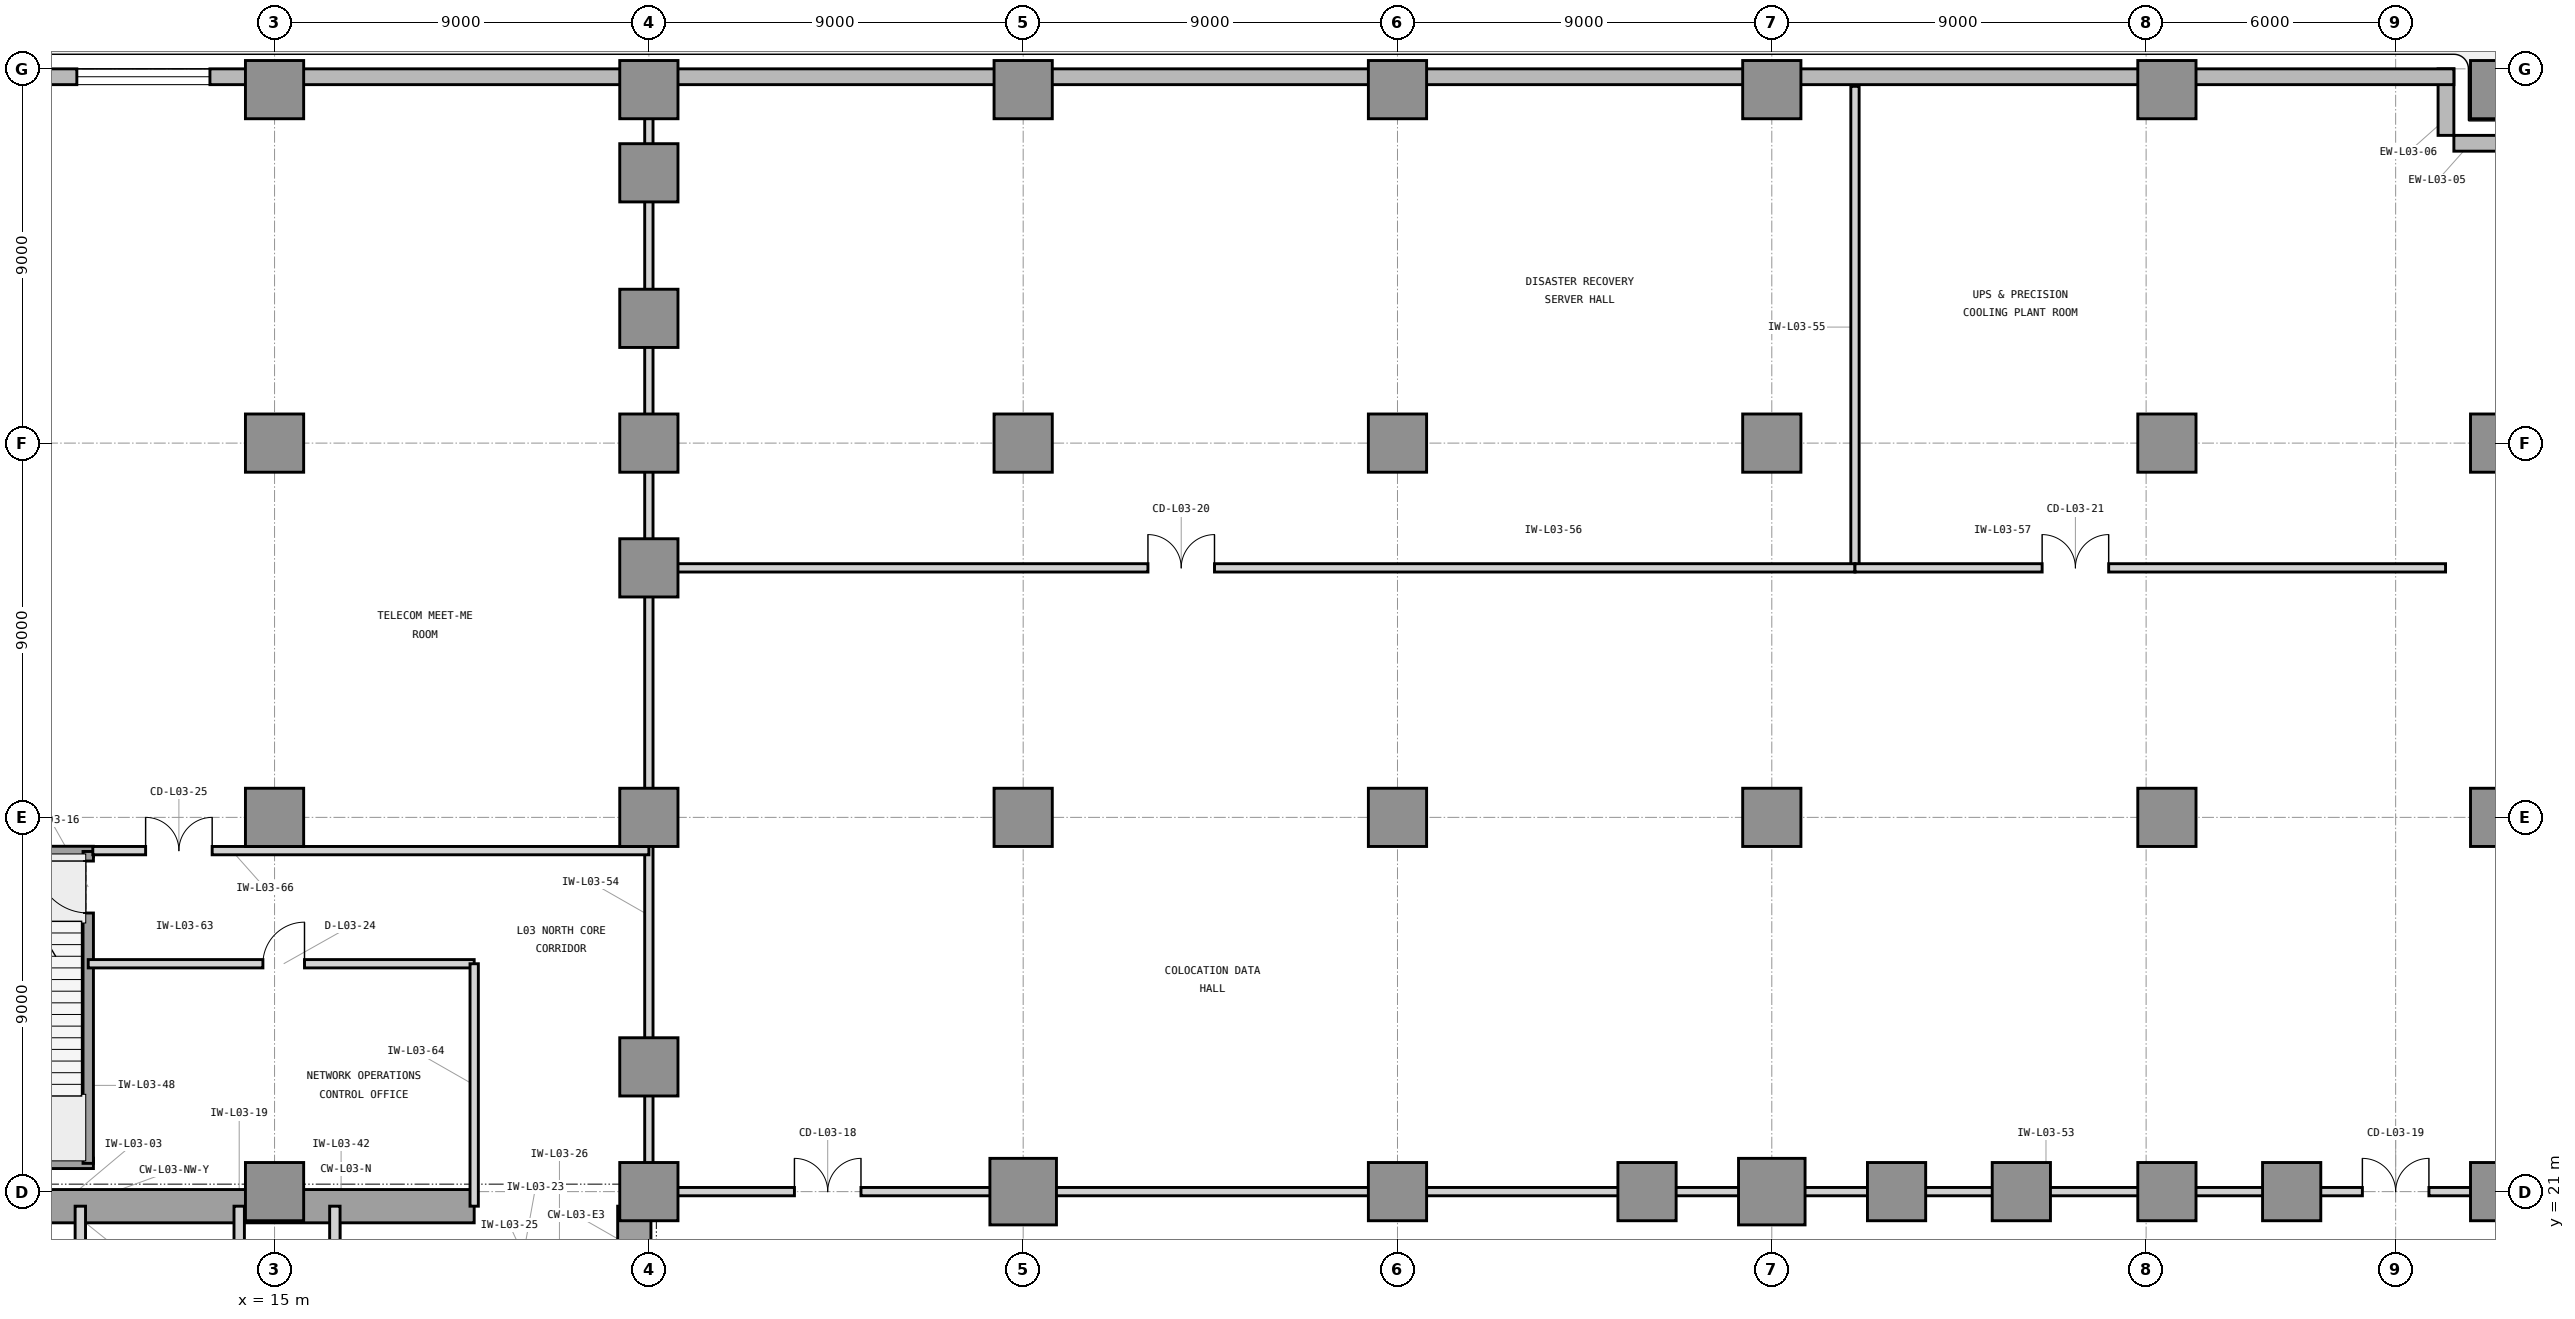
"""IFC4 building model, lengths in metres.
Left out: names, types, materials, properties, quantities, classifications, styles, units other than length and angle.
Written with IfcOpenShell. Run it as: python <this file> out.ifc"""

import sys

from ifc_helpers import new_model, si_unit, direction, frame, frame_2d, origin, origin_2d, place, context, subcontext, project, spatial, rectangle, extrude, element, fill, save


model = new_model("IFC4")
c1 = context("Model", 3, precision=1e-05, world=origin(), true_north=direction((0.0, 1.0)))
c2 = subcontext(c1, "Body", "Model", "MODEL_VIEW")
j1 = project(units=[si_unit("LENGTHUNIT", "METRE"), si_unit("PLANEANGLEUNIT", "RADIAN")], contexts=[c1])
p1 = place(None, origin())
s1 = spatial("IfcSite", under=j1, at=p1, CompositionType="ELEMENT")
p2 = place(p1, origin())
s2 = spatial("IfcBuilding", under=s1, at=p2, CompositionType="ELEMENT")
p3 = place(p2, frame((0.0, 0.0, 16.2)))
s3 = spatial("IfcBuildingStorey", under=s2, at=p3, CompositionType="ELEMENT", Elevation=16.2)
p4 = place(p3, frame((7.475, 20.65, 0.0), z_axis=(0.0, 0.0, 1.0), x_axis=(1.0, 0.0, 0.0)))
e1 = element("IfcWall", 1, at=p4, inside=s3, PredefinedType="SHEAR", context=c2, shape_type="SweptSolid", body=[
    extrude(rectangle(XDim=12.325, YDim=0.8, at=frame_2d((6.163, 0.0))), origin(), (0.0, 0.0, 1.0), 5.4),
])
p5 = place(p3, frame((23.65, 16.6, 0.0), z_axis=(0.0, 0.0, 1.0), x_axis=(0.0, 1.0, 0.0)))
e2 = element("IfcWall", 2, at=p5, inside=s3, PredefinedType="SHEAR", context=c2, shape_type="SweptSolid", body=[
    extrude(rectangle(XDim=4.05, YDim=0.8, at=frame_2d((2.025, 0.0))), origin(), (0.0, 0.0, 1.0), 5.4),
])
for number, where, z_axis, x_axis in (
    (3, (15.0, 21.0, -0.6), (0.0, 0.0, 1.0), (1.0, 0.0, 0.0)),
    (4, (15.0, 30.0, -0.6), (0.0, 0.0, 1.0), (1.0, 0.0, 0.0)),
    (5, (15.0, 39.0, -0.6), (0.0, 0.0, 1.0), (1.0, 0.0, 0.0)),
    (6, (15.0, 47.5, -0.6), (0.0, 0.0, 1.0), (1.0, 0.0, 0.0)),
    (7, (24.0, 21.0, -0.6), (0.0, 0.0, 1.0), (1.0, 0.0, 0.0)),
    (8, (24.0, 30.0, -0.6), (0.0, 0.0, 1.0), (1.0, 0.0, 0.0)),
    (9, (24.0, 39.0, -0.6), (0.0, 0.0, 1.0), (1.0, 0.0, 0.0)),
    (10, (24.0, 47.5, -0.6), (0.0, 0.0, 1.0), (1.0, 0.0, 0.0)),
):
    element("IfcColumn", number, at=place(p3, frame(where, z_axis=z_axis, x_axis=x_axis)), inside=s3, PredefinedType="COLUMN", context=c2, shape_type="SweptSolid", body=[
        extrude(rectangle(XDim=1.4, YDim=1.4, at=origin_2d()), origin(), (0.0, 0.0, 1.0), 6.0),
    ])
p6 = place(p3, frame((33.0, 21.0, -0.6), z_axis=(0.0, 0.0, 1.0), x_axis=(1.0, 0.0, 0.0)))
e11 = element("IfcColumn", 11, at=p6, inside=s3, PredefinedType="COLUMN", context=c2, shape_type="SweptSolid", body=[
    extrude(rectangle(XDim=1.6, YDim=1.6, at=origin_2d()), origin(), (0.0, 0.0, 1.0), 6.0),
])
for number, where, z_axis, x_axis in (
    (12, (33.0, 30.0, -0.6), (0.0, 0.0, 1.0), (1.0, 0.0, 0.0)),
    (13, (33.0, 39.0, -0.6), (0.0, 0.0, 1.0), (1.0, 0.0, 0.0)),
    (14, (33.0, 47.5, -0.6), (0.0, 0.0, 1.0), (1.0, 0.0, 0.0)),
    (15, (42.0, 21.0, -0.6), (0.0, 0.0, 1.0), (1.0, 0.0, 0.0)),
    (16, (42.0, 30.0, -0.6), (0.0, 0.0, 1.0), (1.0, 0.0, 0.0)),
    (17, (42.0, 39.0, -0.6), (0.0, 0.0, 1.0), (1.0, 0.0, 0.0)),
    (18, (42.0, 47.5, -0.6), (0.0, 0.0, 1.0), (1.0, 0.0, 0.0)),
):
    element("IfcColumn", number, at=place(p3, frame(where, z_axis=z_axis, x_axis=x_axis)), inside=s3, PredefinedType="COLUMN", context=c2, shape_type="SweptSolid", body=[
        extrude(rectangle(XDim=1.4, YDim=1.4, at=origin_2d()), origin(), (0.0, 0.0, 1.0), 6.0),
    ])
p7 = place(p3, frame((51.0, 21.0, -0.6), z_axis=(0.0, 0.0, 1.0), x_axis=(1.0, 0.0, 0.0)))
e19 = element("IfcColumn", 19, at=p7, inside=s3, PredefinedType="COLUMN", context=c2, shape_type="SweptSolid", body=[
    extrude(rectangle(XDim=1.6, YDim=1.6, at=origin_2d()), origin(), (0.0, 0.0, 1.0), 6.0),
])
for number, where, z_axis, x_axis in (
    (20, (51.0, 30.0, -0.6), (0.0, 0.0, 1.0), (1.0, 0.0, 0.0)),
    (21, (51.0, 39.0, -0.6), (0.0, 0.0, 1.0), (1.0, 0.0, 0.0)),
    (22, (51.0, 47.5, -0.6), (0.0, 0.0, 1.0), (1.0, 0.0, 0.0)),
    (23, (60.5, 21.0, -0.6), (0.0, 0.0, 1.0), (1.0, 0.0, 0.0)),
    (24, (60.5, 30.0, -0.6), (0.0, 0.0, 1.0), (1.0, 0.0, 0.0)),
    (25, (60.5, 39.0, -0.6), (0.0, 0.0, 1.0), (1.0, 0.0, 0.0)),
    (26, (60.5, 47.5, -0.6), (0.0, 0.0, 1.0), (1.0, 0.0, 0.0)),
    (27, (68.5, 21.0, -0.6), (0.0, 0.0, 1.0), (1.0, 0.0, 0.0)),
    (28, (68.5, 30.0, -0.6), (0.0, 0.0, 1.0), (1.0, 0.0, 0.0)),
    (29, (68.5, 39.0, -0.6), (0.0, 0.0, 1.0), (1.0, 0.0, 0.0)),
    (30, (68.5, 47.5, -0.6), (0.0, 0.0, 1.0), (1.0, 0.0, 0.0)),
    (31, (48.0, 21.0, -0.6), (0.0, 0.0, 1.0), (1.0, 0.0, 0.0)),
    (32, (54.0, 21.0, -0.6), (0.0, 0.0, 1.0), (1.0, 0.0, 0.0)),
    (33, (57.0, 21.0, -0.6), (0.0, 0.0, 1.0), (1.0, 0.0, 0.0)),
    (34, (63.5, 21.0, -0.6), (0.0, 0.0, 1.0), (1.0, 0.0, 0.0)),
    (35, (24.0, 24.0, -0.6), (0.0, 0.0, 1.0), (1.0, 0.0, 0.0)),
    (36, (24.0, 36.0, -0.6), (0.0, 0.0, 1.0), (1.0, 0.0, 0.0)),
    (37, (24.0, 42.0, -0.6), (0.0, 0.0, 1.0), (1.0, 0.0, 0.0)),
    (38, (24.0, 45.5, -0.6), (0.0, 0.0, 1.0), (1.0, 0.0, 0.0)),
):
    element("IfcColumn", number, at=place(p3, frame(where, z_axis=z_axis, x_axis=x_axis)), inside=s3, PredefinedType="COLUMN", context=c2, shape_type="SweptSolid", body=[
        extrude(rectangle(XDim=1.4, YDim=1.4, at=origin_2d()), origin(), (0.0, 0.0, 1.0), 6.0),
    ])
for number, where, z_axis, x_axis in (
    (39, (69.0, 46.21, 0.0), (0.0, 0.0, 1.0), (-1.0, 0.0, 0.0)),
    (40, (67.21, 46.4, 0.0), (0.0, 0.0, 1.0), (0.0, 1.0, 0.0)),
):
    element("IfcWall", number, at=place(p3, frame(where, z_axis=z_axis, x_axis=x_axis)), inside=s3, PredefinedType="STANDARD", context=c2, shape_type="SweptSolid", body=[
        extrude(rectangle(XDim=1.6, YDim=0.38, at=frame_2d((0.8, 0.0))), origin(), (0.0, 0.0, 1.0), 5.18),
    ])
p8 = place(p3, frame((67.4, 47.81, 0.0), z_axis=(0.0, 0.0, 1.0), x_axis=(-1.0, 0.0, 0.0)))
e41 = element("IfcWall", 41, at=p8, inside=s3, PredefinedType="STANDARD", context=c2, shape_type="SweptSolid", body=[
    extrude(rectangle(XDim=62.8, YDim=0.38, at=frame_2d((31.4, 0.0))), origin(), (0.0, 0.0, 1.0), 5.18),
])
p9 = place(p8, frame((53.954, 0.0, 0.9)))
e42 = element("IfcOpeningElement", 42, at=p9, cuts=e41, PredefinedType="OPENING", context=c2, shape_type="SweptSolid", body=[
    extrude(rectangle(XDim=3.2, YDim=3.1, at=frame_2d((1.6, 1.55))), frame((0.0, 0.2, 0.0), z_axis=(0.0, -1.0, 0.0), x_axis=(1.0, 0.0, 0.0)), (0.0, 0.0, 1.0), 0.4),
])
p10 = place(p3, frame((10.33, 19.45, 0.0), z_axis=(0.0, 0.0, 1.0), x_axis=(0.0, 1.0, 0.0)))
e43 = element("IfcWall", 43, at=p10, inside=s3, PredefinedType="PARTITIONING", context=c2, shape_type="SweptSolid", body=[
    extrude(rectangle(XDim=1.2, YDim=0.25, at=frame_2d((0.6, 0.0))), origin(), (0.0, 0.0, 1.0), 4.314),
])
for number, where, z_axis, x_axis in (
    (44, (14.15, 16.7, 0.0), (0.0, 0.0, 1.0), (0.0, 1.0, 0.0)),
    (45, (16.45, 16.7, 0.0), (0.0, 0.0, 1.0), (0.0, 1.0, 0.0)),
):
    element("IfcWall", number, at=place(p3, frame(where, z_axis=z_axis, x_axis=x_axis)), inside=s3, PredefinedType="PARTITIONING", context=c2, shape_type="SweptSolid", body=[
        extrude(rectangle(XDim=3.95, YDim=0.25, at=frame_2d((1.975, 0.0))), origin(), (0.0, 0.0, 1.0), 5.13),
    ])
for number, where, z_axis, x_axis in (
    (46, (6.555, 21.68, 0.0), (0.0, 0.0, 1.0), (1.0, 0.0, 0.0)),
    (47, (6.555, 29.18, 0.0), (0.0, 0.0, 1.0), (1.0, 0.0, 0.0)),
):
    element("IfcWall", number, at=place(p3, frame(where, z_axis=z_axis, x_axis=x_axis)), inside=s3, PredefinedType="SHEAR", context=c2, shape_type="SweptSolid", body=[
        extrude(rectangle(XDim=4.09, YDim=0.25, at=frame_2d((2.045, 0.0))), origin(), (0.0, 0.0, 1.0), 5.4),
    ])
p11 = place(p3, frame((10.52, 21.68, 0.0), z_axis=(0.0, 0.0, 1.0), x_axis=(0.0, 1.0, 0.0)))
e48 = element("IfcWall", 48, at=p11, inside=s3, PredefinedType="SHEAR", context=c2, shape_type="SweptSolid", body=[
    extrude(rectangle(XDim=7.5, YDim=0.25, at=frame_2d((3.75, 0.0))), origin(), (0.0, 0.0, 1.0), 5.4),
])
p12 = place(p11, frame((6.02, 0.0, 0.0)))
e49 = element("IfcOpeningElement", 49, at=p12, cuts=e48, PredefinedType="OPENING", context=c2, shape_type="SweptSolid", body=[
    extrude(rectangle(XDim=1.25, YDim=2.2, at=frame_2d((0.625, 1.1))), frame((0.0, 0.135, 0.0), z_axis=(0.0, -1.0, 0.0), x_axis=(1.0, 0.0, 0.0)), (0.0, 0.0, 1.0), 0.27),
])
p13 = place(p3, frame((24.0, 21.0, 0.0), z_axis=(0.0, 0.0, 1.0), x_axis=(1.0, 0.0, 0.0)))
e50 = element("IfcWall", 50, at=p13, inside=s3, PredefinedType="PARTITIONING", context=c2, shape_type="SweptSolid", body=[
    extrude(rectangle(XDim=44.79, YDim=0.2, at=frame_2d((22.395, 0.0))), origin(), (0.0, 0.0, 1.0), 4.434),
])
p14 = place(p13, frame((3.5, 0.0, 0.0)))
e51 = element("IfcOpeningElement", 51, at=p14, cuts=e50, PredefinedType="OPENING", context=c2, shape_type="SweptSolid", body=[
    extrude(rectangle(XDim=1.6, YDim=2.3, at=frame_2d((0.8, 1.15))), frame((0.0, 0.11, 0.0), z_axis=(0.0, -1.0, 0.0), x_axis=(1.0, 0.0, 0.0)), (0.0, 0.0, 1.0), 0.22),
])
p15 = place(p13, frame((41.2, 0.0, 0.0)))
e52 = element("IfcOpeningElement", 52, at=p15, cuts=e50, PredefinedType="OPENING", context=c2, shape_type="SweptSolid", body=[
    extrude(rectangle(XDim=1.6, YDim=2.3, at=frame_2d((0.8, 1.15))), frame((0.0, 0.11, 0.0), z_axis=(0.0, -1.0, 0.0), x_axis=(1.0, 0.0, 0.0)), (0.0, 0.0, 1.0), 0.22),
])
p16 = place(p3, frame((24.0, 21.0, 0.0), z_axis=(0.0, 0.0, 1.0), x_axis=(0.0, 1.0, 0.0)))
e53 = element("IfcWall", 53, at=p16, inside=s3, PredefinedType="PARTITIONING", context=c2, shape_type="SweptSolid", body=[
    extrude(rectangle(XDim=26.58, YDim=0.2, at=frame_2d((13.29, 0.0))), origin(), (0.0, 0.0, 1.0), 4.434),
])
p17 = place(p3, frame((53.0, 36.0, 0.0), z_axis=(0.0, 0.0, 1.0), x_axis=(0.0, 1.0, 0.0)))
e54 = element("IfcWall", 54, at=p17, inside=s3, PredefinedType="PARTITIONING", context=c2, shape_type="SweptSolid", body=[
    extrude(rectangle(XDim=11.58, YDim=0.2, at=frame_2d((5.79, 0.0))), origin(), (0.0, 0.0, 1.0), 5.13),
])
p18 = place(p3, frame((24.0, 36.0, 0.0), z_axis=(0.0, 0.0, 1.0), x_axis=(1.0, 0.0, 0.0)))
e55 = element("IfcWall", 55, at=p18, inside=s3, PredefinedType="PARTITIONING", context=c2, shape_type="SweptSolid", body=[
    extrude(rectangle(XDim=29.0, YDim=0.2, at=frame_2d((14.5, 0.0))), origin(), (0.0, 0.0, 1.0), 5.13),
])
p19 = place(p18, frame((12.0, 0.0, 0.0)))
e56 = element("IfcOpeningElement", 56, at=p19, cuts=e55, PredefinedType="OPENING", context=c2, shape_type="SweptSolid", body=[
    extrude(rectangle(XDim=1.6, YDim=2.3, at=frame_2d((0.8, 1.15))), frame((0.0, 0.11, 0.0), z_axis=(0.0, -1.0, 0.0), x_axis=(1.0, 0.0, 0.0)), (0.0, 0.0, 1.0), 0.22),
])
p20 = place(p3, frame((53.0, 36.0, 0.0), z_axis=(0.0, 0.0, 1.0), x_axis=(1.0, 0.0, 0.0)))
e57 = element("IfcWall", 57, at=p20, inside=s3, PredefinedType="PARTITIONING", context=c2, shape_type="SweptSolid", body=[
    extrude(rectangle(XDim=14.2, YDim=0.2, at=frame_2d((7.1, 0.0))), origin(), (0.0, 0.0, 1.0), 5.13),
])
p21 = place(p20, frame((4.5, 0.0, 0.0)))
e58 = element("IfcOpeningElement", 58, at=p21, cuts=e57, PredefinedType="OPENING", context=c2, shape_type="SweptSolid", body=[
    extrude(rectangle(XDim=1.6, YDim=2.3, at=frame_2d((0.8, 1.15))), frame((0.0, 0.11, 0.0), z_axis=(0.0, -1.0, 0.0), x_axis=(1.0, 0.0, 0.0)), (0.0, 0.0, 1.0), 0.22),
])
p22 = place(p3, frame((10.52, 26.48, 0.0), z_axis=(0.0, 0.0, 1.0), x_axis=(1.0, 0.0, 0.0)))
e59 = element("IfcWall", 59, at=p22, inside=s3, PredefinedType="PARTITIONING", context=c2, shape_type="SweptSolid", body=[
    extrude(rectangle(XDim=9.28, YDim=0.2, at=frame_2d((4.64, 0.0))), origin(), (0.0, 0.0, 1.0), 5.13),
])
p23 = place(p22, frame((4.2, 0.0, 0.0)))
e60 = element("IfcOpeningElement", 60, at=p23, cuts=e59, PredefinedType="OPENING", context=c2, shape_type="SweptSolid", body=[
    extrude(rectangle(XDim=1.0, YDim=2.15, at=frame_2d((0.5, 1.075))), frame((0.0, 0.11, 0.0), z_axis=(0.0, -1.0, 0.0), x_axis=(1.0, 0.0, 0.0)), (0.0, 0.0, 1.0), 0.22),
])
p24 = place(p3, frame((19.8, 20.65, 0.0), z_axis=(0.0, 0.0, 1.0), x_axis=(0.0, 1.0, 0.0)))
e61 = element("IfcWall", 61, at=p24, inside=s3, PredefinedType="PARTITIONING", context=c2, shape_type="SweptSolid", body=[
    extrude(rectangle(XDim=5.83, YDim=0.2, at=frame_2d((2.915, 0.0))), origin(), (0.0, 0.0, 1.0), 5.13),
])
p25 = place(p3, frame((10.63, 29.2, 0.0), z_axis=(0.0, 0.0, 1.0), x_axis=(1.0, 0.0, 0.0)))
e62 = element("IfcWall", 62, at=p25, inside=s3, PredefinedType="PARTITIONING", context=c2, shape_type="SweptSolid", body=[
    extrude(rectangle(XDim=13.37, YDim=0.2, at=frame_2d((6.685, 0.0))), origin(), (0.0, 0.0, 1.0), 5.13),
])
p26 = place(p25, frame((1.27, 0.0, 0.0)))
e63 = element("IfcOpeningElement", 63, at=p26, cuts=e62, PredefinedType="OPENING", context=c2, shape_type="SweptSolid", body=[
    extrude(rectangle(XDim=1.6, YDim=2.3, at=frame_2d((0.8, 1.15))), frame((0.0, 0.11, 0.0), z_axis=(0.0, -1.0, 0.0), x_axis=(1.0, 0.0, 0.0)), (0.0, 0.0, 1.0), 0.22),
])
p27 = place(p9, origin())
e64 = element("IfcWindow", 64, at=p27, inside=s3, PartitioningType="SINGLE_PANEL", PredefinedType="WINDOW", context=c2, shape_type="SweptSolid", body=[
    extrude(rectangle(XDim=3.2, YDim=3.1, at=frame_2d((1.6, 1.55))), frame((0.0, 0.11, 0.0), z_axis=(0.0, -1.0, 0.0), x_axis=(1.0, 0.0, 0.0)), (0.0, 0.0, 1.0), 0.06),
])
fill(e42, e64)
p28 = place(p12, origin())
e65 = element("IfcDoor", 65, at=p28, inside=s3, OperationType="SINGLE_SWING_RIGHT", PredefinedType="DOOR", context=c2, shape_type="SweptSolid", body=[
    extrude(rectangle(XDim=1.25, YDim=2.2, at=frame_2d((0.625, 1.1))), frame((0.0, 0.025, 0.0), z_axis=(0.0, -1.0, 0.0), x_axis=(1.0, 0.0, 0.0)), (0.0, 0.0, 1.0), 0.05),
])
fill(e49, e65)
p29 = place(p14, origin())
e66 = element("IfcDoor", 66, at=p29, inside=s3, OperationType="DOUBLE_DOOR_SINGLE_SWING", PredefinedType="DOOR", context=c2, shape_type="SweptSolid", body=[
    extrude(rectangle(XDim=1.6, YDim=2.3, at=frame_2d((0.8, 1.15))), frame((0.0, 0.025, 0.0), z_axis=(0.0, -1.0, 0.0), x_axis=(1.0, 0.0, 0.0)), (0.0, 0.0, 1.0), 0.05),
])
fill(e51, e66)
p30 = place(p15, origin())
e67 = element("IfcDoor", 67, at=p30, inside=s3, OperationType="DOUBLE_DOOR_SINGLE_SWING", PredefinedType="DOOR", context=c2, shape_type="SweptSolid", body=[
    extrude(rectangle(XDim=1.6, YDim=2.3, at=frame_2d((0.8, 1.15))), frame((0.0, 0.025, 0.0), z_axis=(0.0, -1.0, 0.0), x_axis=(1.0, 0.0, 0.0)), (0.0, 0.0, 1.0), 0.05),
])
fill(e52, e67)
p31 = place(p19, origin())
e68 = element("IfcDoor", 68, at=p31, inside=s3, OperationType="DOUBLE_DOOR_SINGLE_SWING", PredefinedType="DOOR", context=c2, shape_type="SweptSolid", body=[
    extrude(rectangle(XDim=1.6, YDim=2.3, at=frame_2d((0.8, 1.15))), frame((0.0, 0.025, 0.0), z_axis=(0.0, -1.0, 0.0), x_axis=(1.0, 0.0, 0.0)), (0.0, 0.0, 1.0), 0.05),
])
fill(e56, e68)
p32 = place(p21, origin())
e69 = element("IfcDoor", 69, at=p32, inside=s3, OperationType="DOUBLE_DOOR_SINGLE_SWING", PredefinedType="DOOR", context=c2, shape_type="SweptSolid", body=[
    extrude(rectangle(XDim=1.6, YDim=2.3, at=frame_2d((0.8, 1.15))), frame((0.0, 0.025, 0.0), z_axis=(0.0, -1.0, 0.0), x_axis=(1.0, 0.0, 0.0)), (0.0, 0.0, 1.0), 0.05),
])
fill(e58, e69)
p33 = place(p23, origin())
e70 = element("IfcDoor", 70, at=p33, inside=s3, OperationType="SINGLE_SWING_RIGHT", PredefinedType="DOOR", context=c2, shape_type="SweptSolid", body=[
    extrude(rectangle(XDim=1.0, YDim=2.15, at=frame_2d((0.5, 1.075))), frame((0.0, 0.025, 0.0), z_axis=(0.0, -1.0, 0.0), x_axis=(1.0, 0.0, 0.0)), (0.0, 0.0, 1.0), 0.05),
])
fill(e60, e70)
p34 = place(p26, origin())
e71 = element("IfcDoor", 71, at=p34, inside=s3, OperationType="DOUBLE_DOOR_SINGLE_SWING", PredefinedType="DOOR", context=c2, shape_type="SweptSolid", body=[
    extrude(rectangle(XDim=1.6, YDim=2.3, at=frame_2d((0.8, 1.15))), frame((0.0, 0.025, 0.0), z_axis=(0.0, -1.0, 0.0), x_axis=(1.0, 0.0, 0.0)), (0.0, 0.0, 1.0), 0.05),
])
fill(e63, e71)
save(model, sys.argv[1])
